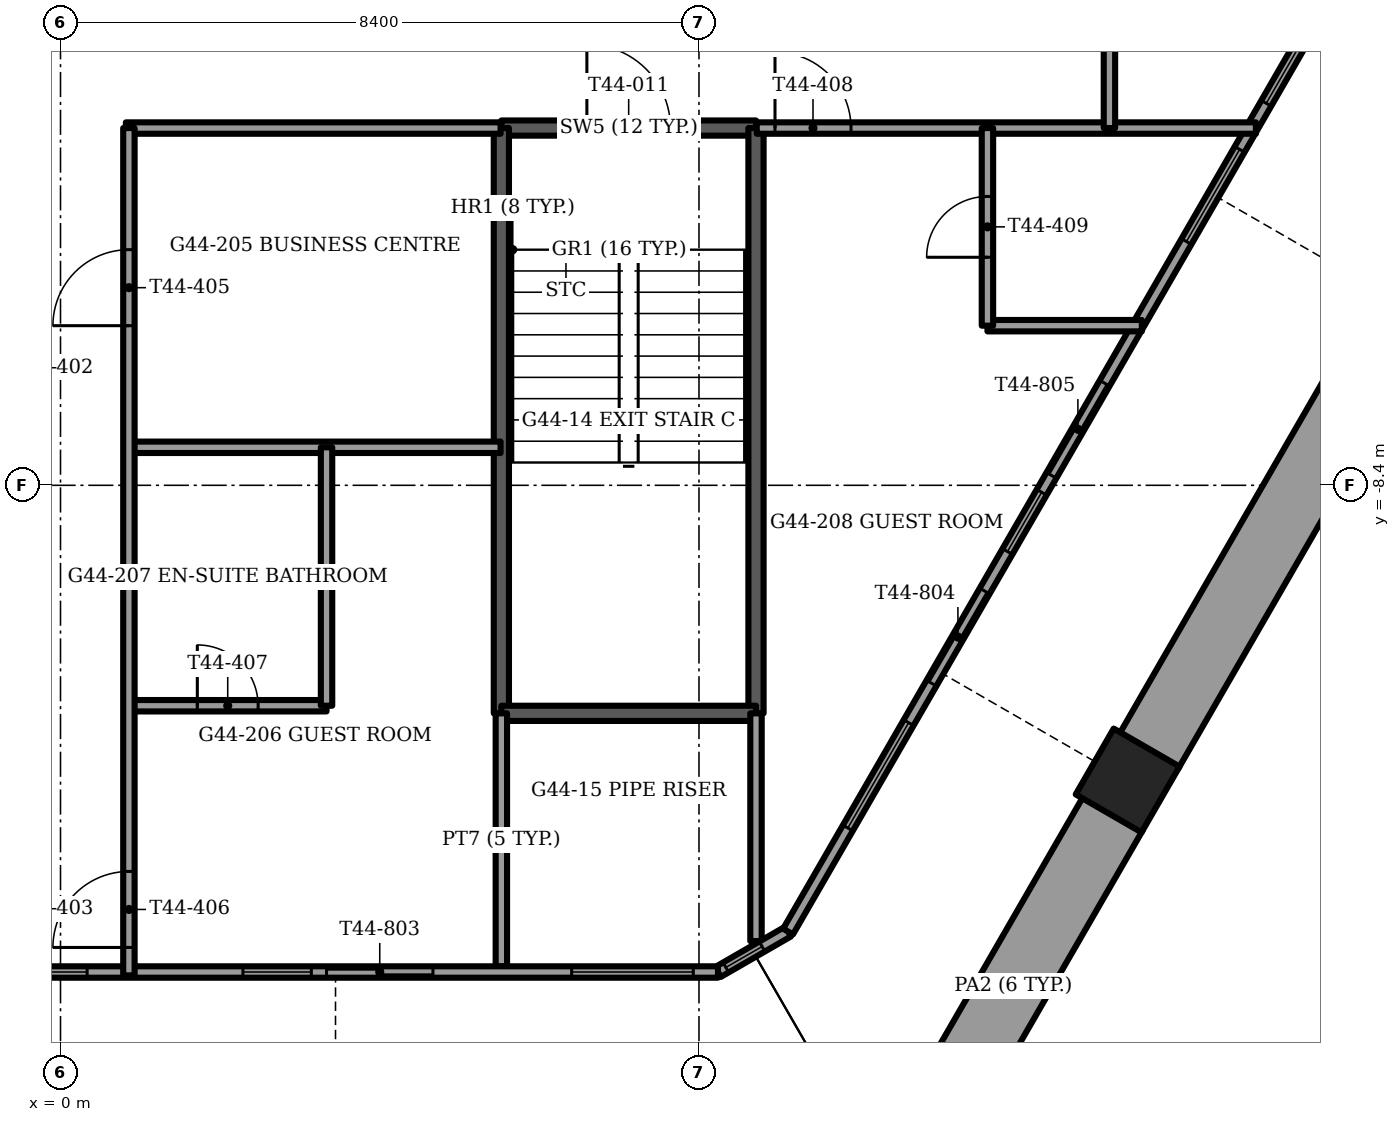
"""IFC4 building model, lengths in metres.
Left out: names, types, materials, properties, quantities, classifications, styles, units other than length and angle.
Written with IfcOpenShell. Run it as: python <this file> out.ifc"""

import sys

from ifc_helpers import new_model, si_unit, direction, frame, frame_2d, origin, origin_2d, place, context, subcontext, project, spatial, rectangle, extrude, element, fill, save


model = new_model("IFC4")
c1 = context("Model", 3, precision=1e-05, world=origin(), true_north=direction((0.0, 1.0)))
c2 = subcontext(c1, "Body", "Model", "MODEL_VIEW")
j1 = project(units=[si_unit("LENGTHUNIT", "METRE"), si_unit("PLANEANGLEUNIT", "RADIAN")], contexts=[c1])
p1 = place(None, origin())
s1 = spatial("IfcSite", under=j1, at=p1, CompositionType="ELEMENT")
p2 = place(p1, origin())
s2 = spatial("IfcBuilding", under=s1, at=p2, CompositionType="ELEMENT")
p3 = place(p2, frame((0.0, 0.0, 179.5)))
s3 = spatial("IfcBuildingStorey", under=s2, at=p3, CompositionType="ELEMENT", Elevation=179.5)
p4 = place(p3, frame((14.039, -12.283, -1.2), z_axis=(0.0, 0.0, 1.0), x_axis=(-0.5, -0.866025403784, 0.0)))
e1 = element("IfcColumn", 1, at=p4, inside=s3, PredefinedType="COLUMN", context=c2, shape_type="SweptSolid", body=[
    extrude(rectangle(XDim=1.0, YDim=1.0, at=origin_2d()), origin(), (0.0, 0.0, 1.0), 3.75),
])
p5 = place(p3, frame((11.225, -17.258, 0.0), z_axis=(0.0, 0.0, 1.0), x_axis=(0.499988348136, 0.866032130887, 0.0)))
e2 = element("IfcWall", 2, at=p5, inside=s3, PredefinedType="PARAPET", context=c2, shape_type="SweptSolid", body=[
    extrude(rectangle(XDim=5.246, YDim=0.9, at=frame_2d((2.623, 0.0))), origin(), (0.0, 0.0, 1.0), 1.1),
])
p6 = place(p3, frame((14.317, -11.901, 0.0), z_axis=(0.0, 0.0, 1.0), x_axis=(0.500013351051, 0.866017695414, 0.0)))
e3 = element("IfcWall", 3, at=p6, inside=s3, PredefinedType="PARAPET", context=c2, shape_type="SweptSolid", body=[
    extrude(rectangle(XDim=6.296, YDim=0.9, at=frame_2d((3.148, 0.0))), origin(), (0.0, 0.0, 1.0), 1.1),
])
p7 = place(p3, frame((-8.65, -14.803, 0.0), z_axis=(0.0, 0.0, 1.0), x_axis=(1.0, 0.0, 0.0)))
e4 = element("IfcWall", 4, at=p7, inside=s3, PredefinedType="SOLIDWALL", context=c2, shape_type="SweptSolid", body=[
    extrude(rectangle(XDim=17.3, YDim=0.15, at=frame_2d((8.65, 0.0))), origin(), (0.0, 0.0, 1.0), 3.45),
])
p8 = place(p7, frame((3.2, 0.0, 0.15)))
e5 = element("IfcOpeningElement", 5, at=p8, cuts=e4, PredefinedType="OPENING", context=c2, shape_type="SweptSolid", body=[
    extrude(rectangle(XDim=1.6, YDim=2.85, at=frame_2d((0.8, 1.425))), frame((0.0, 0.075, 0.0), z_axis=(0.0, -1.0, 0.0), x_axis=(1.0, 0.0, 0.0)), (0.0, 0.0, 1.0), 0.15),
])
p9 = place(p7, frame((4.85, 0.0, 0.0)))
e6 = element("IfcOpeningElement", 6, at=p9, cuts=e4, PredefinedType="OPENING", context=c2, shape_type="SweptSolid", body=[
    extrude(rectangle(XDim=1.4, YDim=2.4, at=frame_2d((0.7, 1.2))), frame((0.0, 0.075, 0.0), z_axis=(0.0, -1.0, 0.0), x_axis=(1.0, 0.0, 0.0)), (0.0, 0.0, 1.0), 0.15),
])
p10 = place(p7, frame((8.1, 0.0, 0.15)))
e7 = element("IfcOpeningElement", 7, at=p10, cuts=e4, PredefinedType="OPENING", context=c2, shape_type="SweptSolid", body=[
    extrude(rectangle(XDim=0.9, YDim=2.85, at=frame_2d((0.45, 1.425))), frame((0.0, 0.075, 0.0), z_axis=(0.0, -1.0, 0.0), x_axis=(1.0, 0.0, 0.0)), (0.0, 0.0, 1.0), 0.15),
])
p11 = place(p7, frame((11.05, 0.0, 0.15)))
e8 = element("IfcOpeningElement", 8, at=p11, cuts=e4, PredefinedType="OPENING", context=c2, shape_type="SweptSolid", body=[
    extrude(rectangle(XDim=0.9, YDim=2.85, at=frame_2d((0.45, 1.425))), frame((0.0, 0.075, 0.0), z_axis=(0.0, -1.0, 0.0), x_axis=(1.0, 0.0, 0.0)), (0.0, 0.0, 1.0), 0.15),
])
p12 = place(p7, frame((12.15, 0.0, 0.0)))
e9 = element("IfcOpeningElement", 9, at=p12, cuts=e4, PredefinedType="OPENING", context=c2, shape_type="SweptSolid", body=[
    extrude(rectangle(XDim=1.4, YDim=2.4, at=frame_2d((0.7, 1.2))), frame((0.0, 0.075, 0.0), z_axis=(0.0, -1.0, 0.0), x_axis=(1.0, 0.0, 0.0)), (0.0, 0.0, 1.0), 0.15),
])
p13 = place(p7, frame((0.325, 0.0, 0.15)))
e10 = element("IfcOpeningElement", 10, at=p13, cuts=e4, PredefinedType="OPENING", context=c2, shape_type="SweptSolid", body=[
    extrude(rectangle(XDim=1.6, YDim=2.73, at=frame_2d((0.8, 1.365))), frame((0.0, 0.075, 0.0), z_axis=(0.0, -1.0, 0.0), x_axis=(1.0, 0.0, 0.0)), (0.0, 0.0, 1.0), 0.15),
])
p14 = place(p7, frame((15.375, 0.0, 0.15)))
e11 = element("IfcOpeningElement", 11, at=p14, cuts=e4, PredefinedType="OPENING", context=c2, shape_type="SweptSolid", body=[
    extrude(rectangle(XDim=1.6, YDim=2.73, at=frame_2d((0.8, 1.365))), frame((0.0, 0.075, 0.0), z_axis=(0.0, -1.0, 0.0), x_axis=(1.0, 0.0, 0.0)), (0.0, 0.0, 1.0), 0.15),
])
p15 = place(p3, frame((9.572, -14.271, 0.0), z_axis=(0.0, 0.0, 1.0), x_axis=(0.500005248668, 0.866022373443, 0.0)))
e12 = element("IfcWall", 12, at=p15, inside=s3, PredefinedType="SOLIDWALL", context=c2, shape_type="SweptSolid", body=[
    extrude(rectangle(XDim=15.145, YDim=0.15, at=frame_2d((7.573, 0.0))), origin(), (0.0, 0.0, 1.0), 3.45),
])
p16 = place(p15, frame((1.573, 0.0, 0.15)))
e13 = element("IfcOpeningElement", 13, at=p16, cuts=e12, PredefinedType="OPENING", context=c2, shape_type="SweptSolid", body=[
    extrude(rectangle(XDim=1.6, YDim=2.85, at=frame_2d((0.8, 1.425))), frame((0.0, 0.075, 0.0), z_axis=(0.0, -1.0, 0.0), x_axis=(1.0, 0.0, 0.0)), (0.0, 0.0, 1.0), 0.15),
])
p17 = place(p15, frame((3.773, 0.0, 0.0)))
e14 = element("IfcOpeningElement", 14, at=p17, cuts=e12, PredefinedType="OPENING", context=c2, shape_type="SweptSolid", body=[
    extrude(rectangle(XDim=1.4, YDim=2.4, at=frame_2d((0.7, 1.2))), frame((0.0, 0.075, 0.0), z_axis=(0.0, -1.0, 0.0), x_axis=(1.0, 0.0, 0.0)), (0.0, 0.0, 1.0), 0.15),
])
p18 = place(p15, frame((5.773, 0.0, 0.15)))
e15 = element("IfcOpeningElement", 15, at=p18, cuts=e12, PredefinedType="OPENING", context=c2, shape_type="SweptSolid", body=[
    extrude(rectangle(XDim=0.9, YDim=2.85, at=frame_2d((0.45, 1.425))), frame((0.0, 0.075, 0.0), z_axis=(0.0, -1.0, 0.0), x_axis=(1.0, 0.0, 0.0)), (0.0, 0.0, 1.0), 0.15),
])
p19 = place(p15, frame((6.93, 0.0, 0.0)))
e16 = element("IfcOpeningElement", 16, at=p19, cuts=e12, PredefinedType="OPENING", context=c2, shape_type="SweptSolid", body=[
    extrude(rectangle(XDim=1.4, YDim=2.4, at=frame_2d((0.7, 1.2))), frame((0.0, 0.075, 0.0), z_axis=(0.0, -1.0, 0.0), x_axis=(1.0, 0.0, 0.0)), (0.0, 0.0, 1.0), 0.15),
])
p20 = place(p15, frame((12.582, 0.0, 0.15)))
e17 = element("IfcOpeningElement", 17, at=p20, cuts=e12, PredefinedType="OPENING", context=c2, shape_type="SweptSolid", body=[
    extrude(rectangle(XDim=0.9, YDim=2.85, at=frame_2d((0.45, 1.425))), frame((0.0, 0.075, 0.0), z_axis=(0.0, -1.0, 0.0), x_axis=(1.0, 0.0, 0.0)), (0.0, 0.0, 1.0), 0.15),
])
p21 = place(p15, frame((10.482, 0.0, 0.15)))
e18 = element("IfcOpeningElement", 18, at=p21, cuts=e12, PredefinedType="OPENING", context=c2, shape_type="SweptSolid", body=[
    extrude(rectangle(XDim=1.4, YDim=2.85, at=frame_2d((0.7, 1.425))), frame((0.0, 0.075, 0.0), z_axis=(0.0, -1.0, 0.0), x_axis=(1.0, 0.0, 0.0)), (0.0, 0.0, 1.0), 0.15),
])
p22 = place(p3, frame((8.65, -14.803, 0.0), z_axis=(0.0, 0.0, 1.0), x_axis=(0.865990848561, 0.500059846627, 0.0)))
e19 = element("IfcWall", 19, at=p22, inside=s3, PredefinedType="SOLIDWALL", context=c2, shape_type="SweptSolid", body=[
    extrude(rectangle(XDim=1.065, YDim=0.15, at=frame_2d((0.532, 0.0))), origin(), (0.0, 0.0, 1.0), 3.45),
])
p23 = place(p22, frame((0.12, 0.0, 0.15)))
e20 = element("IfcOpeningElement", 20, at=p23, cuts=e19, PredefinedType="OPENING", context=c2, shape_type="SweptSolid", body=[
    extrude(rectangle(XDim=0.55, YDim=2.85, at=frame_2d((0.275, 1.425))), frame((0.0, 0.075, 0.0), z_axis=(0.0, -1.0, 0.0), x_axis=(1.0, 0.0, 0.0)), (0.0, 0.0, 1.0), 0.15),
])
p24 = place(p3, frame((5.8, -3.7, -0.3), z_axis=(0.0, 0.0, 1.0), x_axis=(1.0, 0.0, 0.0)))
e21 = element("IfcWall", 21, at=p24, inside=s3, PredefinedType="SOLIDWALL", context=c2, shape_type="SweptSolid", body=[
    extrude(rectangle(XDim=3.35, YDim=0.2, at=frame_2d((1.675, 0.0))), origin(), (0.0, 0.0, 1.0), 3.75),
])
p25 = place(p24, frame((1.125, 0.0, 0.0)))
e22 = element("IfcOpeningElement", 22, at=p25, cuts=e21, PredefinedType="OPENING", context=c2, shape_type="SweptSolid", body=[
    extrude(rectangle(XDim=1.1, YDim=2.1, at=frame_2d((0.55, 1.05))), frame((0.0, 0.1, 0.0), z_axis=(0.0, -1.0, 0.0), x_axis=(1.0, 0.0, 0.0)), (0.0, 0.0, 1.0), 0.2),
])
for number, where, z_axis, x_axis in (
    (23, (5.8, -3.7, -0.3), (0.0, 0.0, 1.0), (0.0, -1.0, 0.0)),
    (24, (9.15, -3.7, -0.3), (0.0, 0.0, 1.0), (0.0, -1.0, 0.0)),
):
    element("IfcWall", number, at=place(p3, frame(where, z_axis=z_axis, x_axis=x_axis)), inside=s3, PredefinedType="SOLIDWALL", context=c2, shape_type="SweptSolid", body=[
        extrude(rectangle(XDim=7.7, YDim=0.2, at=frame_2d((3.85, 0.0))), origin(), (0.0, 0.0, 1.0), 3.75),
    ])
p26 = place(p3, frame((5.8, -11.4, -0.3), z_axis=(0.0, 0.0, 1.0), x_axis=(1.0, 0.0, 0.0)))
e25 = element("IfcWall", 25, at=p26, inside=s3, PredefinedType="SOLIDWALL", context=c2, shape_type="SweptSolid", body=[
    extrude(rectangle(XDim=3.35, YDim=0.2, at=frame_2d((1.675, 0.0))), origin(), (0.0, 0.0, 1.0), 3.75),
])
p27 = place(p3, frame((5.8, -11.4, 0.0), z_axis=(0.0, 0.0, 1.0), x_axis=(0.0, -1.0, 0.0)))
e26 = element("IfcWall", 26, at=p27, inside=s3, PredefinedType="PARTITIONING", context=c2, shape_type="SweptSolid", body=[
    extrude(rectangle(XDim=3.328, YDim=0.15, at=frame_2d((1.664, 0.0))), origin(), (0.0, 0.0, 1.0), 3.45),
])
p28 = place(p3, frame((9.15, -11.4, 0.0), z_axis=(0.0, 0.0, 1.0), x_axis=(0.0, -1.0, 0.0)))
e27 = element("IfcWall", 27, at=p28, inside=s3, PredefinedType="PARTITIONING", context=c2, shape_type="SweptSolid", body=[
    extrude(rectangle(XDim=2.996, YDim=0.15, at=frame_2d((1.498, 0.0))), origin(), (0.0, 0.0, 1.0), 3.45),
])
p29 = place(p3, frame((0.9, -11.3, 0.0), z_axis=(0.0, 0.0, 1.0), x_axis=(1.0, 0.0, 0.0)))
e28 = element("IfcWall", 28, at=p29, inside=s3, PredefinedType="PARTITIONING", context=c2, shape_type="SweptSolid", body=[
    extrude(rectangle(XDim=2.6, YDim=0.15, at=frame_2d((1.3, 0.0))), origin(), (0.0, 0.0, 1.0), 3.45),
])
p30 = place(p29, frame((0.9, 0.0, 0.0)))
e29 = element("IfcOpeningElement", 29, at=p30, cuts=e28, PredefinedType="OPENING", context=c2, shape_type="SweptSolid", body=[
    extrude(rectangle(XDim=0.8, YDim=2.1, at=frame_2d((0.4, 1.05))), frame((0.0, 0.075, 0.0), z_axis=(0.0, -1.0, 0.0), x_axis=(1.0, 0.0, 0.0)), (0.0, 0.0, 1.0), 0.15),
])
p31 = place(p3, frame((0.9, -7.9, 0.0), z_axis=(0.0, 0.0, 1.0), x_axis=(1.0, 0.0, 0.0)))
e30 = element("IfcWall", 30, at=p31, inside=s3, PredefinedType="PARTITIONING", context=c2, shape_type="SweptSolid", body=[
    extrude(rectangle(XDim=4.89, YDim=0.15, at=frame_2d((2.445, 0.0))), origin(), (0.0, 0.0, 1.0), 3.45),
])
p32 = place(p3, frame((12.195, -6.3, 0.0), z_axis=(0.0, 0.0, 1.0), x_axis=(1.0, 0.0, 0.0)))
e31 = element("IfcWall", 31, at=p32, inside=s3, PredefinedType="PARTITIONING", context=c2, shape_type="SweptSolid", body=[
    extrude(rectangle(XDim=2.031, YDim=0.15, at=frame_2d((1.016, 0.0))), origin(), (0.0, 0.0, 1.0), 3.45),
])
p33 = place(p3, frame((0.86, -3.7, 0.0), z_axis=(0.0, 0.0, 1.0), x_axis=(1.0, 0.0, 0.0)))
e32 = element("IfcWall", 32, at=p33, inside=s3, PredefinedType="PARTITIONING", context=c2, shape_type="SweptSolid", body=[
    extrude(rectangle(XDim=4.93, YDim=0.15, at=frame_2d((2.465, 0.0))), origin(), (0.0, 0.0, 1.0), 3.45),
])
p34 = place(p3, frame((9.16, -3.7, 0.0), z_axis=(0.0, 0.0, 1.0), x_axis=(1.0, 0.0, 0.0)))
e33 = element("IfcWall", 33, at=p34, inside=s3, PredefinedType="PARTITIONING", context=c2, shape_type="SweptSolid", body=[
    extrude(rectangle(XDim=6.567, YDim=0.15, at=frame_2d((3.284, 0.0))), origin(), (0.0, 0.0, 1.0), 3.45),
])
p35 = place(p34, frame((0.24, 0.0, 0.0)))
e34 = element("IfcOpeningElement", 34, at=p35, cuts=e33, PredefinedType="OPENING", context=c2, shape_type="SweptSolid", body=[
    extrude(rectangle(XDim=1.0, YDim=2.1, at=frame_2d((0.5, 1.05))), frame((0.0, 0.075, 0.0), z_axis=(0.0, -1.0, 0.0), x_axis=(1.0, 0.0, 0.0)), (0.0, 0.0, 1.0), 0.15),
])
p36 = place(p3, frame((13.8, -3.7, 0.0), z_axis=(0.0, 0.0, 1.0), x_axis=(0.0, 1.0, 0.0)))
e35 = element("IfcWall", 35, at=p36, inside=s3, PredefinedType="PARTITIONING", context=c2, shape_type="SweptSolid", body=[
    extrude(rectangle(XDim=2.0, YDim=0.15, at=frame_2d((1.0, 0.0))), origin(), (0.0, 0.0, 1.0), 3.45),
])
p37 = place(p3, frame((12.195, -6.3, 0.0), z_axis=(0.0, 0.0, 1.0), x_axis=(0.0, 1.0, 0.0)))
e36 = element("IfcWall", 36, at=p37, inside=s3, PredefinedType="PARTITIONING", context=c2, shape_type="SweptSolid", body=[
    extrude(rectangle(XDim=2.6, YDim=0.15, at=frame_2d((1.3, 0.0))), origin(), (0.0, 0.0, 1.0), 3.45),
])
p38 = place(p37, frame((0.9, 0.0, 0.0)))
e37 = element("IfcOpeningElement", 37, at=p38, cuts=e36, PredefinedType="OPENING", context=c2, shape_type="SweptSolid", body=[
    extrude(rectangle(XDim=0.8, YDim=2.1, at=frame_2d((0.4, 1.05))), frame((0.0, 0.075, 0.0), z_axis=(0.0, -1.0, 0.0), x_axis=(1.0, 0.0, 0.0)), (0.0, 0.0, 1.0), 0.15),
])
p39 = place(p3, frame((3.5, -11.3, 0.0), z_axis=(0.0, 0.0, 1.0), x_axis=(0.0, 1.0, 0.0)))
e38 = element("IfcWall", 38, at=p39, inside=s3, PredefinedType="PARTITIONING", context=c2, shape_type="SweptSolid", body=[
    extrude(rectangle(XDim=3.4, YDim=0.15, at=frame_2d((1.7, 0.0))), origin(), (0.0, 0.0, 1.0), 3.45),
])
p40 = place(p3, frame((0.9, -14.848, 0.0), z_axis=(0.0, 0.0, 1.0), x_axis=(0.0, 1.0, 0.0)))
e39 = element("IfcWall", 39, at=p40, inside=s3, PredefinedType="PARTITIONING", context=c2, shape_type="SweptSolid", body=[
    extrude(rectangle(XDim=11.148, YDim=0.15, at=frame_2d((5.574, 0.0))), origin(), (0.0, 0.0, 1.0), 3.45),
])
p41 = place(p40, frame((8.548, 0.0, 0.0)))
e40 = element("IfcOpeningElement", 40, at=p41, cuts=e39, PredefinedType="OPENING", context=c2, shape_type="SweptSolid", body=[
    extrude(rectangle(XDim=1.0, YDim=2.1, at=frame_2d((0.5, 1.05))), frame((0.0, 0.075, 0.0), z_axis=(0.0, -1.0, 0.0), x_axis=(1.0, 0.0, 0.0)), (0.0, 0.0, 1.0), 0.15),
])
p42 = place(p40, frame((0.368, 0.0, 0.0)))
e41 = element("IfcOpeningElement", 41, at=p42, cuts=e39, PredefinedType="OPENING", context=c2, shape_type="SweptSolid", body=[
    extrude(rectangle(XDim=1.0, YDim=2.1, at=frame_2d((0.5, 1.05))), frame((0.0, 0.075, 0.0), z_axis=(0.0, -1.0, 0.0), x_axis=(1.0, 0.0, 0.0)), (0.0, 0.0, 1.0), 0.15),
])
p43 = place(p10, origin())
e42 = element("IfcWindow", 42, at=p43, inside=s3, PartitioningType="SINGLE_PANEL", PredefinedType="WINDOW", context=c2, shape_type="SweptSolid", body=[
    extrude(rectangle(XDim=0.9, YDim=2.85, at=frame_2d((0.45, 1.425))), frame((0.0, 0.03, 0.0), z_axis=(0.0, -1.0, 0.0), x_axis=(1.0, 0.0, 0.0)), (0.0, 0.0, 1.0), 0.06),
])
fill(e7, e42)
p44 = place(p11, origin())
e43 = element("IfcWindow", 43, at=p44, inside=s3, PartitioningType="SINGLE_PANEL", PredefinedType="WINDOW", context=c2, shape_type="SweptSolid", body=[
    extrude(rectangle(XDim=0.9, YDim=2.85, at=frame_2d((0.45, 1.425))), frame((0.0, 0.03, 0.0), z_axis=(0.0, -1.0, 0.0), x_axis=(1.0, 0.0, 0.0)), (0.0, 0.0, 1.0), 0.06),
])
fill(e8, e43)
p45 = place(p12, origin())
e44 = element("IfcDoor", 44, at=p45, inside=s3, OperationType="SLIDING_TO_LEFT", PredefinedType="DOOR", context=c2, shape_type="SweptSolid", body=[
    extrude(rectangle(XDim=1.4, YDim=2.4, at=frame_2d((0.7, 1.2))), frame((0.0, 0.025, 0.0), z_axis=(0.0, -1.0, 0.0), x_axis=(1.0, 0.0, 0.0)), (0.0, 0.0, 1.0), 0.05),
])
fill(e9, e44)
p46 = place(p14, origin())
e45 = element("IfcWindow", 45, at=p46, inside=s3, PartitioningType="SINGLE_PANEL", PredefinedType="WINDOW", context=c2, shape_type="SweptSolid", body=[
    extrude(rectangle(XDim=1.6, YDim=2.73, at=frame_2d((0.8, 1.365))), frame((0.0, 0.03, 0.0), z_axis=(0.0, -1.0, 0.0), x_axis=(1.0, 0.0, 0.0)), (0.0, 0.0, 1.0), 0.06),
])
fill(e11, e45)
p47 = place(p16, origin())
e46 = element("IfcWindow", 46, at=p47, inside=s3, PartitioningType="SINGLE_PANEL", PredefinedType="WINDOW", context=c2, shape_type="SweptSolid", body=[
    extrude(rectangle(XDim=1.6, YDim=2.85, at=frame_2d((0.8, 1.425))), frame((0.0, 0.03, 0.0), z_axis=(0.0, -1.0, 0.0), x_axis=(1.0, 0.0, 0.0)), (0.0, 0.0, 1.0), 0.06),
])
fill(e13, e46)
p48 = place(p17, origin())
e47 = element("IfcDoor", 47, at=p48, inside=s3, OperationType="SLIDING_TO_LEFT", PredefinedType="DOOR", context=c2, shape_type="SweptSolid", body=[
    extrude(rectangle(XDim=1.4, YDim=2.4, at=frame_2d((0.7, 1.2))), frame((0.0, 0.025, 0.0), z_axis=(0.0, -1.0, 0.0), x_axis=(1.0, 0.0, 0.0)), (0.0, 0.0, 1.0), 0.05),
])
fill(e14, e47)
p49 = place(p18, origin())
e48 = element("IfcWindow", 48, at=p49, inside=s3, PartitioningType="SINGLE_PANEL", PredefinedType="WINDOW", context=c2, shape_type="SweptSolid", body=[
    extrude(rectangle(XDim=0.9, YDim=2.85, at=frame_2d((0.45, 1.425))), frame((0.0, 0.03, 0.0), z_axis=(0.0, -1.0, 0.0), x_axis=(1.0, 0.0, 0.0)), (0.0, 0.0, 1.0), 0.06),
])
fill(e15, e48)
p50 = place(p19, origin())
e49 = element("IfcDoor", 49, at=p50, inside=s3, OperationType="SLIDING_TO_RIGHT", PredefinedType="DOOR", context=c2, shape_type="SweptSolid", body=[
    extrude(rectangle(XDim=1.4, YDim=2.4, at=frame_2d((0.7, 1.2))), frame((0.0, 0.025, 0.0), z_axis=(0.0, -1.0, 0.0), x_axis=(1.0, 0.0, 0.0)), (0.0, 0.0, 1.0), 0.05),
])
fill(e16, e49)
p51 = place(p20, origin())
e50 = element("IfcWindow", 50, at=p51, inside=s3, PartitioningType="SINGLE_PANEL", PredefinedType="WINDOW", context=c2, shape_type="SweptSolid", body=[
    extrude(rectangle(XDim=0.9, YDim=2.85, at=frame_2d((0.45, 1.425))), frame((0.0, 0.03, 0.0), z_axis=(0.0, -1.0, 0.0), x_axis=(1.0, 0.0, 0.0)), (0.0, 0.0, 1.0), 0.06),
])
fill(e17, e50)
p52 = place(p21, origin())
e51 = element("IfcWindow", 51, at=p52, inside=s3, PartitioningType="SINGLE_PANEL", PredefinedType="WINDOW", context=c2, shape_type="SweptSolid", body=[
    extrude(rectangle(XDim=1.4, YDim=2.85, at=frame_2d((0.7, 1.425))), frame((0.0, 0.03, 0.0), z_axis=(0.0, -1.0, 0.0), x_axis=(1.0, 0.0, 0.0)), (0.0, 0.0, 1.0), 0.06),
])
fill(e18, e51)
p53 = place(p23, origin())
e52 = element("IfcWindow", 52, at=p53, inside=s3, PartitioningType="SINGLE_PANEL", PredefinedType="WINDOW", context=c2, shape_type="SweptSolid", body=[
    extrude(rectangle(XDim=0.55, YDim=2.85, at=frame_2d((0.275, 1.425))), frame((0.0, 0.03, 0.0), z_axis=(0.0, -1.0, 0.0), x_axis=(1.0, 0.0, 0.0)), (0.0, 0.0, 1.0), 0.06),
])
fill(e20, e52)
p54 = place(p25, origin())
e53 = element("IfcDoor", 53, at=p54, inside=s3, OperationType="SINGLE_SWING_LEFT", PredefinedType="DOOR", context=c2, shape_type="SweptSolid", body=[
    extrude(rectangle(XDim=1.1, YDim=2.1, at=frame_2d((0.55, 1.05))), frame((0.0, 0.025, 0.0), z_axis=(0.0, -1.0, 0.0), x_axis=(1.0, 0.0, 0.0)), (0.0, 0.0, 1.0), 0.05),
])
fill(e22, e53)
p55 = place(p41, origin())
e54 = element("IfcDoor", 54, at=p55, inside=s3, OperationType="SINGLE_SWING_RIGHT", PredefinedType="DOOR", context=c2, shape_type="SweptSolid", body=[
    extrude(rectangle(XDim=1.0, YDim=2.1, at=frame_2d((0.5, 1.05))), frame((0.0, 0.025, 0.0), z_axis=(0.0, -1.0, 0.0), x_axis=(1.0, 0.0, 0.0)), (0.0, 0.0, 1.0), 0.05),
])
fill(e40, e54)
p56 = place(p42, origin())
e55 = element("IfcDoor", 55, at=p56, inside=s3, OperationType="SINGLE_SWING_LEFT", PredefinedType="DOOR", context=c2, shape_type="SweptSolid", body=[
    extrude(rectangle(XDim=1.0, YDim=2.1, at=frame_2d((0.5, 1.05))), frame((0.0, 0.025, 0.0), z_axis=(0.0, -1.0, 0.0), x_axis=(1.0, 0.0, 0.0)), (0.0, 0.0, 1.0), 0.05),
])
fill(e41, e55)
p57 = place(p30, origin())
e56 = element("IfcDoor", 56, at=p57, inside=s3, OperationType="SINGLE_SWING_LEFT", PredefinedType="DOOR", context=c2, shape_type="SweptSolid", body=[
    extrude(rectangle(XDim=0.8, YDim=2.1, at=frame_2d((0.4, 1.05))), frame((0.0, 0.025, 0.0), z_axis=(0.0, -1.0, 0.0), x_axis=(1.0, 0.0, 0.0)), (0.0, 0.0, 1.0), 0.05),
])
fill(e29, e56)
p58 = place(p35, origin())
e57 = element("IfcDoor", 57, at=p58, inside=s3, OperationType="SINGLE_SWING_LEFT", PredefinedType="DOOR", context=c2, shape_type="SweptSolid", body=[
    extrude(rectangle(XDim=1.0, YDim=2.1, at=frame_2d((0.5, 1.05))), frame((0.0, 0.025, 0.0), z_axis=(0.0, -1.0, 0.0), x_axis=(1.0, 0.0, 0.0)), (0.0, 0.0, 1.0), 0.05),
])
fill(e34, e57)
p59 = place(p38, origin())
e58 = element("IfcDoor", 58, at=p59, inside=s3, OperationType="SINGLE_SWING_RIGHT", PredefinedType="DOOR", context=c2, shape_type="SweptSolid", body=[
    extrude(rectangle(XDim=0.8, YDim=2.1, at=frame_2d((0.4, 1.05))), frame((0.0, 0.025, 0.0), z_axis=(0.0, -1.0, 0.0), x_axis=(1.0, 0.0, 0.0)), (0.0, 0.0, 1.0), 0.05),
])
fill(e37, e58)
save(model, sys.argv[1])
